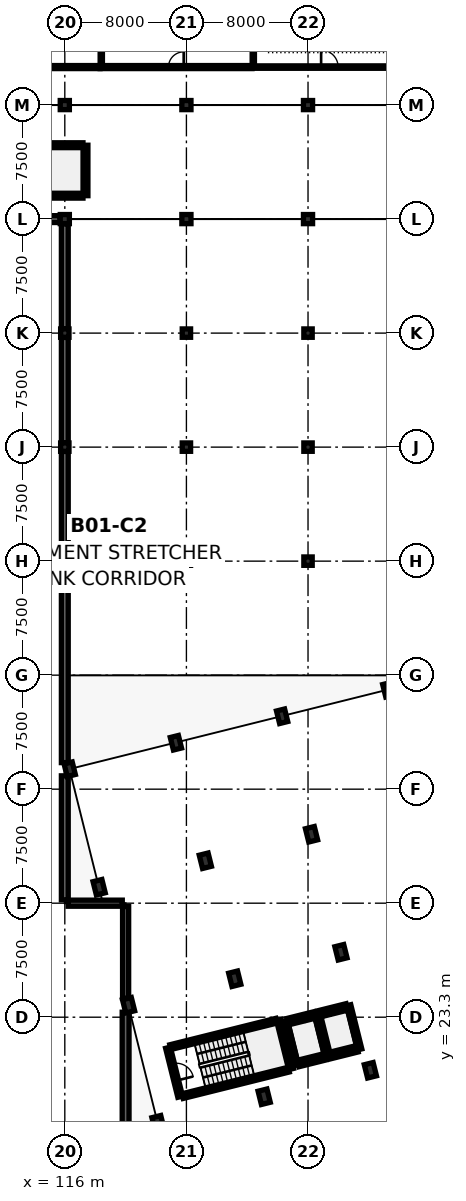
"""IFC4 building model, lengths in metres.
Left out: names, types, materials, properties, quantities, classifications, styles, units other than length and angle.
Written with IfcOpenShell. Run it as: python <this file> out.ifc"""

import sys

from ifc_helpers import new_model, si_unit, direction, frame, frame_2d, origin, origin_2d, place, context, subcontext, project, spatial, rectangle, extrude, element, fill, save


model = new_model("IFC4")
c1 = context("Model", 3, precision=1e-05, world=origin(), true_north=direction((0.0, 1.0)))
c2 = subcontext(c1, "Body", "Model", "MODEL_VIEW")
j1 = project(units=[si_unit("LENGTHUNIT", "METRE"), si_unit("PLANEANGLEUNIT", "RADIAN")], contexts=[c1])
p1 = place(None, origin())
s1 = spatial("IfcSite", under=j1, at=p1, CompositionType="ELEMENT")
p2 = place(p1, origin())
s2 = spatial("IfcBuilding", under=s1, at=p2, CompositionType="ELEMENT")
p3 = place(p2, frame((0.0, 0.0, -4.2)))
s3 = spatial("IfcBuildingStorey", under=s2, at=p3, CompositionType="ELEMENT", Elevation=-4.2)
p4 = place(p3, frame((116.0, 53.3, 0.0), z_axis=(0.0, 0.0, 1.0), x_axis=(1.0, 0.0, 0.0)))
e1 = element("IfcColumn", 1, at=p4, inside=s3, PredefinedType="COLUMN", context=c2, shape_type="SweptSolid", body=[
    extrude(rectangle(XDim=0.6, YDim=0.6, at=origin_2d()), origin(), (0.0, 0.0, 1.0), 3.78),
])
for number, where, z_axis, x_axis in (
    (2, (116.0, 60.8, 0.0), (0.0, 0.0, 1.0), (1.0, 0.0, 0.0)),
    (3, (116.0, 68.3, 0.0), (0.0, 0.0, 1.0), (1.0, 0.0, 0.0)),
):
    element("IfcColumn", number, at=place(p3, frame(where, z_axis=z_axis, x_axis=x_axis)), inside=s3, PredefinedType="COLUMN", context=c2, shape_type="SweptSolid", body=[
        extrude(rectangle(XDim=0.55, YDim=0.55, at=origin_2d()), origin(), (0.0, 0.0, 1.0), 3.78),
    ])
p5 = place(p3, frame((116.0, 75.8, 0.0), z_axis=(0.0, 0.0, 1.0), x_axis=(1.0, 0.0, 0.0)))
e4 = element("IfcColumn", 4, at=p5, inside=s3, PredefinedType="COLUMN", context=c2, shape_type="SweptSolid", body=[
    extrude(rectangle(XDim=0.6, YDim=0.6, at=origin_2d()), origin(), (0.0, 0.0, 1.0), 3.78),
])
p6 = place(p3, frame((116.0, 83.3, 0.0), z_axis=(0.0, 0.0, 1.0), x_axis=(1.0, 0.0, 0.0)))
e5 = element("IfcColumn", 5, at=p6, inside=s3, PredefinedType="COLUMN", context=c2, shape_type="SweptSolid", body=[
    extrude(rectangle(XDim=0.6, YDim=0.6, at=origin_2d()), origin(), (0.0, 0.0, 1.0), 3.75),
])
for number, where, z_axis, x_axis in (
    (6, (124.0, 53.3, 0.0), (0.0, 0.0, 1.0), (1.0, 0.0, 0.0)),
    (7, (124.0, 60.8, 0.0), (0.0, 0.0, 1.0), (1.0, 0.0, 0.0)),
    (8, (124.0, 68.3, 0.0), (0.0, 0.0, 1.0), (1.0, 0.0, 0.0)),
):
    element("IfcColumn", number, at=place(p3, frame(where, z_axis=z_axis, x_axis=x_axis)), inside=s3, PredefinedType="COLUMN", context=c2, shape_type="SweptSolid", body=[
        extrude(rectangle(XDim=0.55, YDim=0.55, at=origin_2d()), origin(), (0.0, 0.0, 1.0), 3.78),
    ])
p7 = place(p3, frame((124.0, 75.8, 0.0), z_axis=(0.0, 0.0, 1.0), x_axis=(1.0, 0.0, 0.0)))
e9 = element("IfcColumn", 9, at=p7, inside=s3, PredefinedType="COLUMN", context=c2, shape_type="SweptSolid", body=[
    extrude(rectangle(XDim=0.6, YDim=0.6, at=origin_2d()), origin(), (0.0, 0.0, 1.0), 3.78),
])
p8 = place(p3, frame((124.0, 83.3, 0.0), z_axis=(0.0, 0.0, 1.0), x_axis=(1.0, 0.0, 0.0)))
e10 = element("IfcColumn", 10, at=p8, inside=s3, PredefinedType="COLUMN", context=c2, shape_type="SweptSolid", body=[
    extrude(rectangle(XDim=0.6, YDim=0.6, at=origin_2d()), origin(), (0.0, 0.0, 1.0), 3.75),
])
for number, where, z_axis, x_axis in (
    (11, (132.0, 53.3, 0.0), (0.0, 0.0, 1.0), (1.0, 0.0, 0.0)),
    (12, (132.0, 60.8, 0.0), (0.0, 0.0, 1.0), (1.0, 0.0, 0.0)),
    (13, (132.0, 68.3, 0.0), (0.0, 0.0, 1.0), (1.0, 0.0, 0.0)),
):
    element("IfcColumn", number, at=place(p3, frame(where, z_axis=z_axis, x_axis=x_axis)), inside=s3, PredefinedType="COLUMN", context=c2, shape_type="SweptSolid", body=[
        extrude(rectangle(XDim=0.55, YDim=0.55, at=origin_2d()), origin(), (0.0, 0.0, 1.0), 3.78),
    ])
p9 = place(p3, frame((132.0, 75.8, 0.0), z_axis=(0.0, 0.0, 1.0), x_axis=(1.0, 0.0, 0.0)))
e14 = element("IfcColumn", 14, at=p9, inside=s3, PredefinedType="COLUMN", context=c2, shape_type="SweptSolid", body=[
    extrude(rectangle(XDim=0.6, YDim=0.6, at=origin_2d()), origin(), (0.0, 0.0, 1.0), 3.78),
])
p10 = place(p3, frame((132.0, 83.3, 0.0), z_axis=(0.0, 0.0, 1.0), x_axis=(1.0, 0.0, 0.0)))
e15 = element("IfcColumn", 15, at=p10, inside=s3, PredefinedType="COLUMN", context=c2, shape_type="SweptSolid", body=[
    extrude(rectangle(XDim=0.6, YDim=0.6, at=origin_2d()), origin(), (0.0, 0.0, 1.0), 3.75),
])
for number, where, z_axis, x_axis in (
    (16, (122.129, 16.325, 0.0), (0.0, 0.0, 1.0), (0.97, 0.242, 0.0)),
    (17, (120.194, 24.087, 0.0), (0.0, 0.0, 1.0), (0.97, 0.242, 0.0)),
    (18, (118.259, 31.849, 0.0), (0.0, 0.0, 1.0), (0.97, 0.242, 0.0)),
):
    element("IfcColumn", number, at=place(p3, frame(where, z_axis=z_axis, x_axis=x_axis)), inside=s3, PredefinedType="COLUMN", context=c2, shape_type="SweptSolid", body=[
        extrude(rectangle(XDim=0.6, YDim=0.9, at=origin_2d()), origin(), (0.0, 0.0, 1.0), 3.78),
    ])
p11 = place(p3, frame((116.323, 39.612, 0.0), z_axis=(0.0, 0.0, 1.0), x_axis=(0.970295726276, 0.2419218956, 0.0)))
e19 = element("IfcColumn", 19, at=p11, inside=s3, PredefinedType="COLUMN", context=c2, shape_type="SweptSolid", body=[
    extrude(rectangle(XDim=0.55, YDim=0.85, at=origin_2d()), origin(), (0.0, 0.0, 1.0), 3.78),
])
for number, where, z_axis, x_axis in (
    (20, (129.115, 18.067, 0.0), (0.0, 0.0, 1.0), (0.97, 0.242, 0.0)),
    (21, (127.18, 25.829, 0.0), (0.0, 0.0, 1.0), (0.97, 0.242, 0.0)),
    (22, (125.245, 33.591, 0.0), (0.0, 0.0, 1.0), (0.97, 0.242, 0.0)),
):
    element("IfcColumn", number, at=place(p3, frame(where, z_axis=z_axis, x_axis=x_axis)), inside=s3, PredefinedType="COLUMN", context=c2, shape_type="SweptSolid", body=[
        extrude(rectangle(XDim=0.6, YDim=0.9, at=origin_2d()), origin(), (0.0, 0.0, 1.0), 3.78),
    ])
p12 = place(p3, frame((123.309, 41.354, 0.0), z_axis=(0.0, 0.0, 1.0), x_axis=(0.970295726276, 0.2419218956, 0.0)))
e23 = element("IfcColumn", 23, at=p12, inside=s3, PredefinedType="COLUMN", context=c2, shape_type="SweptSolid", body=[
    extrude(rectangle(XDim=0.55, YDim=0.85, at=origin_2d()), origin(), (0.0, 0.0, 1.0), 3.78),
])
for number, where, z_axis, x_axis in (
    (24, (136.102, 19.808, 0.0), (0.0, 0.0, 1.0), (0.97, 0.242, 0.0)),
    (25, (134.166, 27.571, 0.0), (0.0, 0.0, 1.0), (0.97, 0.242, 0.0)),
    (26, (132.231, 35.333, 0.0), (0.0, 0.0, 1.0), (0.97, 0.242, 0.0)),
):
    element("IfcColumn", number, at=place(p3, frame(where, z_axis=z_axis, x_axis=x_axis)), inside=s3, PredefinedType="COLUMN", context=c2, shape_type="SweptSolid", body=[
        extrude(rectangle(XDim=0.6, YDim=0.9, at=origin_2d()), origin(), (0.0, 0.0, 1.0), 3.78),
    ])
for number, where, z_axis, x_axis in (
    (27, (130.295, 43.095, 0.0), (0.0, 0.0, 1.0), (0.97, 0.242, 0.0)),
    (28, (137.281, 44.837, 0.0), (0.0, 0.0, 1.0), (0.97, 0.242, 0.0)),
):
    element("IfcColumn", number, at=place(p3, frame(where, z_axis=z_axis, x_axis=x_axis)), inside=s3, PredefinedType="COLUMN", context=c2, shape_type="SweptSolid", body=[
        extrude(rectangle(XDim=0.55, YDim=0.85, at=origin_2d()), origin(), (0.0, 0.0, 1.0), 3.78),
    ])
p13 = place(p3, frame((120.0, 11.22, 0.0), z_axis=(0.0, 0.0, 1.0), x_axis=(0.0, 1.0, 0.0)))
e29 = element("IfcWall", 29, at=p13, inside=s3, PredefinedType="USERDEFINED", context=c2, shape_type="SweptSolid", body=[
    extrude(rectangle(XDim=12.407, YDim=0.45, at=frame_2d((6.204, 0.0))), origin(), (0.0, 0.0, 1.0), 3.75),
])
p14 = place(p3, frame((120.0, 24.547, 0.0), z_axis=(0.0, 0.0, 1.0), x_axis=(0.0, 1.0, 0.0)))
e30 = element("IfcWall", 30, at=p14, inside=s3, PredefinedType="USERDEFINED", context=c2, shape_type="SweptSolid", body=[
    extrude(rectangle(XDim=6.033, YDim=0.4, at=frame_2d((3.017, 0.0))), origin(), (0.0, 0.0, 1.0), 3.75),
])
p15 = place(p3, frame((119.78, 30.8, 0.0), z_axis=(0.0, 0.0, 1.0), x_axis=(-1.0, 0.0, 0.0)))
e31 = element("IfcWall", 31, at=p15, inside=s3, PredefinedType="USERDEFINED", context=c2, shape_type="SweptSolid", body=[
    extrude(rectangle(XDim=3.56, YDim=0.4, at=frame_2d((1.78, 0.0))), origin(), (0.0, 0.0, 1.0), 3.75),
])
p16 = place(p3, frame((116.0, 31.02, 0.0), z_axis=(0.0, 0.0, 1.0), x_axis=(0.0, 1.0, 0.0)))
e32 = element("IfcWall", 32, at=p16, inside=s3, PredefinedType="USERDEFINED", context=c2, shape_type="SweptSolid", body=[
    extrude(rectangle(XDim=8.157, YDim=0.45, at=frame_2d((4.078, 0.0))), origin(), (0.0, 0.0, 1.0), 3.75),
])
p17 = place(p3, frame((116.0, 40.047, 0.0), z_axis=(0.0, 0.0, 1.0), x_axis=(0.0, 1.0, 0.0)))
e33 = element("IfcWall", 33, at=p17, inside=s3, PredefinedType="USERDEFINED", context=c2, shape_type="SweptSolid", body=[
    extrude(rectangle(XDim=12.943, YDim=0.45, at=frame_2d((6.472, 0.0))), origin(), (0.0, 0.0, 1.0), 3.75),
])
p18 = place(p3, frame((116.0, 53.61, 0.0), z_axis=(0.0, 0.0, 1.0), x_axis=(0.0, 1.0, 0.0)))
e34 = element("IfcWall", 34, at=p18, inside=s3, PredefinedType="USERDEFINED", context=c2, shape_type="SweptSolid", body=[
    extrude(rectangle(XDim=6.905, YDim=0.45, at=frame_2d((3.452, 0.0))), origin(), (0.0, 0.0, 1.0), 3.13),
])
p19 = place(p3, frame((116.0, 61.085, 0.0), z_axis=(0.0, 0.0, 1.0), x_axis=(0.0, 1.0, 0.0)))
e35 = element("IfcWall", 35, at=p19, inside=s3, PredefinedType="USERDEFINED", context=c2, shape_type="SweptSolid", body=[
    extrude(rectangle(XDim=6.93, YDim=0.45, at=frame_2d((3.465, 0.0))), origin(), (0.0, 0.0, 1.0), 3.13),
])
p20 = place(p3, frame((116.0, 68.585, 0.0), z_axis=(0.0, 0.0, 1.0), x_axis=(0.0, 1.0, 0.0)))
e36 = element("IfcWall", 36, at=p20, inside=s3, PredefinedType="USERDEFINED", context=c2, shape_type="SweptSolid", body=[
    extrude(rectangle(XDim=6.905, YDim=0.45, at=frame_2d((3.453, 0.0))), origin(), (0.0, 0.0, 1.0), 3.13),
])
p21 = place(p3, frame((115.69, 75.8, 0.0), z_axis=(0.0, 0.0, 1.0), x_axis=(-1.0, 0.0, 0.0)))
e37 = element("IfcWall", 37, at=p21, inside=s3, PredefinedType="USERDEFINED", context=c2, shape_type="SweptSolid", body=[
    extrude(rectangle(XDim=7.305, YDim=0.45, at=frame_2d((3.652, 0.0))), origin(), (0.0, 0.0, 1.0), 3.08),
])
p22 = place(p3, frame((123.75, 18.11, 0.0), z_axis=(0.0, 0.0, 1.0), x_axis=(0.970294108333, 0.241928384724, 0.0)))
e38 = element("IfcWall", 38, at=p22, inside=s3, PredefinedType="SHEAR", context=c2, shape_type="SweptSolid", body=[
    extrude(rectangle(XDim=7.19, YDim=0.32, at=frame_2d((3.595, 0.0))), origin(), (0.0, 0.0, 1.0), 3.78),
])
p23 = place(p3, frame((130.887, 19.889, 0.0), z_axis=(0.0, 0.0, 1.0), x_axis=(-0.241947258837, 0.970289402158, 0.0)))
e39 = element("IfcWall", 39, at=p23, inside=s3, PredefinedType="SHEAR", context=c2, shape_type="SweptSolid", body=[
    extrude(rectangle(XDim=3.32, YDim=0.32, at=frame_2d((1.66, 0.0))), origin(), (0.0, 0.0, 1.0), 3.78),
])
p24 = place(p3, frame((129.924, 23.071, 0.0), z_axis=(0.0, 0.0, 1.0), x_axis=(-0.970294108333, -0.241928384724, 0.0)))
e40 = element("IfcWall", 40, at=p24, inside=s3, PredefinedType="SHEAR", context=c2, shape_type="SweptSolid", body=[
    extrude(rectangle(XDim=7.19, YDim=0.32, at=frame_2d((3.595, 0.0))), origin(), (0.0, 0.0, 1.0), 3.78),
])
p25 = place(p3, frame((122.787, 21.292, 0.0), z_axis=(0.0, 0.0, 1.0), x_axis=(0.241860763027, -0.970310966293, 0.0)))
e41 = element("IfcWall", 41, at=p25, inside=s3, PredefinedType="SHEAR", context=c2, shape_type="SweptSolid", body=[
    extrude(rectangle(XDim=3.32, YDim=0.32, at=frame_2d((1.66, 0.0))), origin(), (0.0, 0.0, 1.0), 3.78),
])
p26 = place(p25, frame((1.085, 0.0, 0.0)))
e42 = element("IfcOpeningElement", 42, at=p26, cuts=e41, PredefinedType="OPENING", context=c2, shape_type="SweptSolid", body=[
    extrude(rectangle(XDim=1.15, YDim=2.15, at=frame_2d((0.575, 1.075))), frame((0.0, 0.172, 0.0), z_axis=(0.0, -1.0, 0.0), x_axis=(1.0, 0.0, 0.0)), (0.0, 0.0, 1.0), 0.344),
])
p27 = place(p3, frame((131.363, 20.176, 0.0), z_axis=(0.0, 0.0, 1.0), x_axis=(0.970284587517, 0.241966566341, 0.0)))
e43 = element("IfcWall", 43, at=p27, inside=s3, PredefinedType="SHEAR", context=c2, shape_type="SweptSolid", body=[
    extrude(rectangle(XDim=1.817, YDim=0.28, at=frame_2d((0.909, 0.0))), origin(), (0.0, 0.0, 1.0), 3.78),
])
p28 = place(p3, frame((133.267, 20.651, 0.0), z_axis=(0.0, 0.0, 1.0), x_axis=(-0.241921647353, 0.970295788171, 0.0)))
e44 = element("IfcWall", 44, at=p28, inside=s3, PredefinedType="SHEAR", context=c2, shape_type="SweptSolid", body=[
    extrude(rectangle(XDim=2.994, YDim=0.28, at=frame_2d((1.497, 0.0))), origin(), (0.0, 0.0, 1.0), 3.78),
])
p29 = place(p3, frame((132.402, 23.521, 0.0), z_axis=(0.0, 0.0, 1.0), x_axis=(-0.970284587517, -0.241966566341, 0.0)))
e45 = element("IfcWall", 45, at=p29, inside=s3, PredefinedType="SHEAR", context=c2, shape_type="SweptSolid", body=[
    extrude(rectangle(XDim=1.817, YDim=0.28, at=frame_2d((0.909, 0.0))), origin(), (0.0, 0.0, 1.0), 3.78),
])
p30 = place(p29, frame((0.259, 0.0, 0.0)))
e46 = element("IfcOpeningElement", 46, at=p30, cuts=e45, PredefinedType="OPENING", context=c2, shape_type="SweptSolid", body=[
    extrude(rectangle(XDim=1.3, YDim=2.2, at=frame_2d((0.65, 1.1))), frame((0.0, 0.152, 0.0), z_axis=(0.0, -1.0, 0.0), x_axis=(1.0, 0.0, 0.0)), (0.0, 0.0, 1.0), 0.304),
])
p31 = place(p3, frame((130.498, 23.046, 0.0), z_axis=(0.0, 0.0, 1.0), x_axis=(0.241921647353, -0.970295788171, 0.0)))
e47 = element("IfcWall", 47, at=p31, inside=s3, PredefinedType="SHEAR", context=c2, shape_type="SweptSolid", body=[
    extrude(rectangle(XDim=2.994, YDim=0.28, at=frame_2d((1.497, 0.0))), origin(), (0.0, 0.0, 1.0), 3.78),
])
p32 = place(p3, frame((133.408, 20.686, 0.0), z_axis=(0.0, 0.0, 1.0), x_axis=(0.970285190026, 0.241964150272, 0.0)))
e48 = element("IfcWall", 48, at=p32, inside=s3, PredefinedType="SHEAR", context=c2, shape_type="SweptSolid", body=[
    extrude(rectangle(XDim=1.91, YDim=0.28, at=frame_2d((0.955, 0.0))), origin(), (0.0, 0.0, 1.0), 3.78),
])
p33 = place(p3, frame((135.402, 21.183, 0.0), z_axis=(0.0, 0.0, 1.0), x_axis=(-0.241921647353, 0.970295788171, 0.0)))
e49 = element("IfcWall", 49, at=p33, inside=s3, PredefinedType="SHEAR", context=c2, shape_type="SweptSolid", body=[
    extrude(rectangle(XDim=2.994, YDim=0.28, at=frame_2d((1.497, 0.0))), origin(), (0.0, 0.0, 1.0), 3.78),
])
p34 = place(p3, frame((134.537, 24.053, 0.0), z_axis=(0.0, 0.0, 1.0), x_axis=(-0.970285190026, -0.241964150272, 0.0)))
e50 = element("IfcWall", 50, at=p34, inside=s3, PredefinedType="SHEAR", context=c2, shape_type="SweptSolid", body=[
    extrude(rectangle(XDim=1.91, YDim=0.28, at=frame_2d((0.955, 0.0))), origin(), (0.0, 0.0, 1.0), 3.78),
])
p35 = place(p34, frame((0.305, 0.0, 0.0)))
e51 = element("IfcOpeningElement", 51, at=p35, cuts=e50, PredefinedType="OPENING", context=c2, shape_type="SweptSolid", body=[
    extrude(rectangle(XDim=1.3, YDim=2.2, at=frame_2d((0.65, 1.1))), frame((0.0, 0.152, 0.0), z_axis=(0.0, -1.0, 0.0), x_axis=(1.0, 0.0, 0.0)), (0.0, 0.0, 1.0), 0.304),
])
p36 = place(p3, frame((110.005, 77.34, 0.0), z_axis=(0.0, 0.0, 1.0), x_axis=(1.0, 0.0, 0.0)))
e52 = element("IfcWall", 52, at=p36, inside=s3, PredefinedType="SHEAR", context=c2, shape_type="SweptSolid", body=[
    extrude(rectangle(XDim=7.19, YDim=0.32, at=frame_2d((3.595, 0.0))), origin(), (0.0, 0.0, 1.0), 3.78),
])
p37 = place(p3, frame((117.36, 77.34, 0.0), z_axis=(0.0, 0.0, 1.0), x_axis=(0.0, 1.0, 0.0)))
e53 = element("IfcWall", 53, at=p37, inside=s3, PredefinedType="SHEAR", context=c2, shape_type="SweptSolid", body=[
    extrude(rectangle(XDim=3.32, YDim=0.32, at=frame_2d((1.66, 0.0))), origin(), (0.0, 0.0, 1.0), 3.78),
])
p38 = place(p3, frame((117.195, 80.66, 0.0), z_axis=(0.0, 0.0, 1.0), x_axis=(-1.0, 0.0, 0.0)))
e54 = element("IfcWall", 54, at=p38, inside=s3, PredefinedType="SHEAR", context=c2, shape_type="SweptSolid", body=[
    extrude(rectangle(XDim=7.19, YDim=0.32, at=frame_2d((3.595, 0.0))), origin(), (0.0, 0.0, 1.0), 3.78),
])
p39 = place(p3, frame((108.485, 85.8, 0.0), z_axis=(0.0, 0.0, 1.0), x_axis=(1.0, 0.0, 0.0)))
e55 = element("IfcWall", 55, at=p39, inside=s3, PredefinedType="PARTITIONING", context=c2, shape_type="SweptSolid", body=[
    extrude(rectangle(XDim=9.83, YDim=0.2, at=frame_2d((4.915, 0.0))), origin(), (0.0, 0.0, 1.0), 3.035),
])
p40 = place(p39, frame((4.415, 0.0, 0.0)))
e56 = element("IfcOpeningElement", 56, at=p40, cuts=e55, PredefinedType="OPENING", context=c2, shape_type="SweptSolid", body=[
    extrude(rectangle(XDim=1.0, YDim=2.15, at=frame_2d((0.5, 1.075))), frame((0.0, 0.112, 0.0), z_axis=(0.0, -1.0, 0.0), x_axis=(1.0, 0.0, 0.0)), (0.0, 0.0, 1.0), 0.224),
])
p41 = place(p3, frame((118.327, 85.8, 0.0), z_axis=(0.0, 0.0, 1.0), x_axis=(1.0, 0.0, 0.0)))
e57 = element("IfcWall", 57, at=p41, inside=s3, PredefinedType="PARTITIONING", context=c2, shape_type="SweptSolid", body=[
    extrude(rectangle(XDim=9.988, YDim=0.2, at=frame_2d((4.994, 0.0))), origin(), (0.0, 0.0, 1.0), 3.035),
])
p42 = place(p41, frame((4.494, 0.0, 0.0)))
e58 = element("IfcOpeningElement", 58, at=p42, cuts=e57, PredefinedType="OPENING", context=c2, shape_type="SweptSolid", body=[
    extrude(rectangle(XDim=1.0, YDim=2.15, at=frame_2d((0.5, 1.075))), frame((0.0, 0.112, 0.0), z_axis=(0.0, -1.0, 0.0), x_axis=(1.0, 0.0, 0.0)), (0.0, 0.0, 1.0), 0.224),
])
p43 = place(p3, frame((128.327, 85.8, 0.0), z_axis=(0.0, 0.0, 1.0), x_axis=(1.0, 0.0, 0.0)))
e59 = element("IfcWall", 59, at=p43, inside=s3, PredefinedType="PARTITIONING", context=c2, shape_type="SweptSolid", body=[
    extrude(rectangle(XDim=10.188, YDim=0.16, at=frame_2d((5.094, 0.0))), origin(), (0.0, 0.0, 1.0), 3.035),
])
p44 = place(p43, frame((4.534, 0.0, 0.0)))
e60 = element("IfcOpeningElement", 60, at=p44, cuts=e59, PredefinedType="OPENING", context=c2, shape_type="SweptSolid", body=[
    extrude(rectangle(XDim=1.12, YDim=2.2, at=frame_2d((0.56, 1.1))), frame((0.0, 0.092, 0.0), z_axis=(0.0, -1.0, 0.0), x_axis=(1.0, 0.0, 0.0)), (0.0, 0.0, 1.0), 0.184),
])
for number, where, z_axis, x_axis in (
    (61, (118.4, 85.892, 0.0), (0.0, 0.0, 1.0), (0.0, 1.0, 0.0)),
    (62, (128.4, 85.892, 0.0), (0.0, 0.0, 1.0), (0.0, 1.0, 0.0)),
):
    element("IfcWall", number, at=place(p3, frame(where, z_axis=z_axis, x_axis=x_axis)), inside=s3, PredefinedType="PARTITIONING", context=c2, shape_type="SweptSolid", body=[
        extrude(rectangle(XDim=12.421, YDim=0.15, at=frame_2d((6.21, 0.0))), origin(), (0.0, 0.0, 1.0), 2.935),
    ])
p45 = place(p26, origin())
e63 = element("IfcDoor", 63, at=p45, inside=s3, OperationType="SINGLE_SWING_RIGHT", PredefinedType="DOOR", context=c2, shape_type="SweptSolid", body=[
    extrude(rectangle(XDim=1.15, YDim=2.15, at=frame_2d((0.575, 1.075))), frame((0.0, 0.025, 0.0), z_axis=(0.0, -1.0, 0.0), x_axis=(1.0, 0.0, 0.0)), (0.0, 0.0, 1.0), 0.05),
])
fill(e42, e63)
p46 = place(p30, origin())
e64 = element("IfcDoor", 64, at=p46, inside=s3, OperationType="SLIDING_TO_LEFT", PredefinedType="DOOR", context=c2, shape_type="SweptSolid", body=[
    extrude(rectangle(XDim=1.3, YDim=2.2, at=frame_2d((0.65, 1.1))), frame((0.0, 0.025, 0.0), z_axis=(0.0, -1.0, 0.0), x_axis=(1.0, 0.0, 0.0)), (0.0, 0.0, 1.0), 0.05),
])
fill(e46, e64)
p47 = place(p35, origin())
e65 = element("IfcDoor", 65, at=p47, inside=s3, OperationType="SLIDING_TO_RIGHT", PredefinedType="DOOR", context=c2, shape_type="SweptSolid", body=[
    extrude(rectangle(XDim=1.3, YDim=2.2, at=frame_2d((0.65, 1.1))), frame((0.0, 0.025, 0.0), z_axis=(0.0, -1.0, 0.0), x_axis=(1.0, 0.0, 0.0)), (0.0, 0.0, 1.0), 0.05),
])
fill(e51, e65)
p48 = place(p42, origin())
e66 = element("IfcDoor", 66, at=p48, inside=s3, OperationType="SINGLE_SWING_RIGHT", PredefinedType="DOOR", context=c2, shape_type="SweptSolid", body=[
    extrude(rectangle(XDim=1.0, YDim=2.15, at=frame_2d((0.5, 1.075))), frame((0.0, 0.025, 0.0), z_axis=(0.0, -1.0, 0.0), x_axis=(1.0, 0.0, 0.0)), (0.0, 0.0, 1.0), 0.05),
])
fill(e58, e66)
p49 = place(p44, origin())
e67 = element("IfcDoor", 67, at=p49, inside=s3, OperationType="SINGLE_SWING_LEFT", PredefinedType="DOOR", context=c2, shape_type="SweptSolid", body=[
    extrude(rectangle(XDim=1.12, YDim=2.2, at=frame_2d((0.56, 1.1))), frame((0.0, 0.025, 0.0), z_axis=(0.0, -1.0, 0.0), x_axis=(1.0, 0.0, 0.0)), (0.0, 0.0, 1.0), 0.05),
])
fill(e60, e67)
save(model, sys.argv[1])
